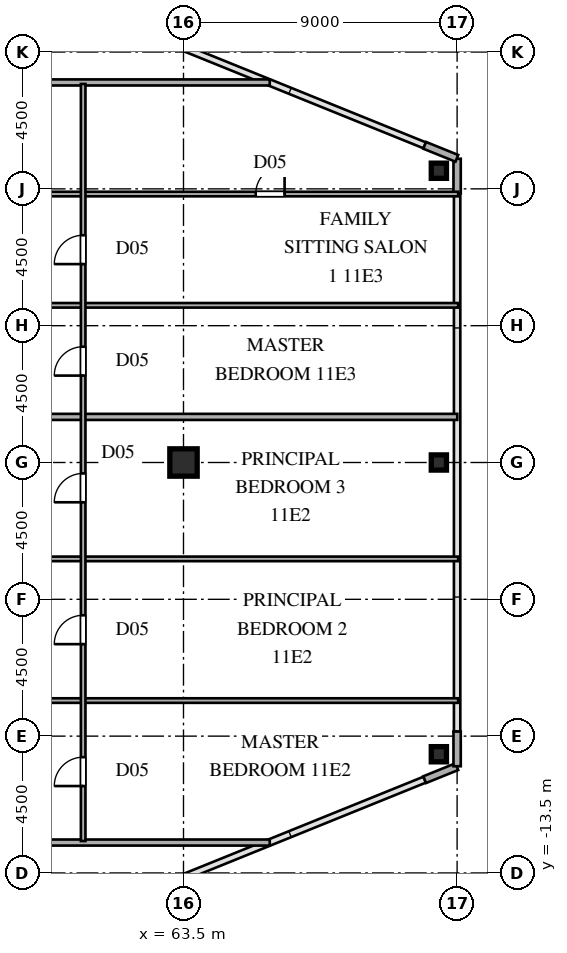
"""IFC4 building model, lengths in metres.
Left out: names, types, materials, properties, quantities, classifications, styles, units other than length and angle.
Written with IfcOpenShell. Run it as: python <this file> out.ifc"""

import sys

from ifc_helpers import new_model, si_unit, direction, frame, frame_2d, origin, origin_2d, place, context, subcontext, project, spatial, rectangle, hollow_rectangle, i_section, extrude, source, transform, mapped, element, fill, save


model = new_model("IFC4")
c1 = context("Model", 3, precision=1e-05, world=origin(), true_north=direction((0.0, 1.0)))
c2 = subcontext(c1, "Body", "Model", "MODEL_VIEW")
j1 = project(units=[si_unit("LENGTHUNIT", "METRE"), si_unit("PLANEANGLEUNIT", "RADIAN")], contexts=[c1])
p1 = place(None, origin())
s1 = spatial("IfcSite", under=j1, at=p1, CompositionType="ELEMENT")
p2 = place(p1, origin())
s2 = spatial("IfcBuilding", under=s1, at=p2, CompositionType="ELEMENT")
p3 = place(p2, frame((0.0, 0.0, 44.1)))
s3 = spatial("IfcBuildingStorey", under=s2, at=p3, CompositionType="ELEMENT", Elevation=44.1)
m1 = source(origin(), c2, "Body", "SweptSolid", [
    extrude(i_section(OverallWidth=0.9, OverallDepth=0.9, WebThickness=0.036, FlangeThickness=0.055, at=origin_2d()), origin(), (0.0, 0.0, 1.0), 3.6),
])
p4 = place(p3, frame((63.5, 0.0, 0.0), z_axis=(0.0, 0.0, 1.0), x_axis=(1.0, 0.0, 0.0)))
e1 = element("IfcColumn", 1, at=p4, inside=s3, PredefinedType="COLUMN", context=c2, shape_type="MappedRepresentation", body=[
    mapped(m1, transform((0.0, 0.0, 0.0), scale=1.0)),
])
m2 = source(origin(), c2, "Body", "SweptSolid", [
    extrude(hollow_rectangle(XDim=0.5, YDim=0.5, WallThickness=0.02, at=origin_2d()), origin(), (0.0, 0.0, 1.0), 3.6),
])
for number, where, z_axis, x_axis in (
    (2, (71.9, -9.596, 0.0), (0.0, 0.0, 1.0), (1.0, 0.0, 0.0)),
    (3, (71.9, 9.596, 0.0), (0.0, 0.0, 1.0), (1.0, 0.0, 0.0)),
    (4, (71.9, 0.0, 0.0), (0.0, 0.0, 1.0), (1.0, 0.0, 0.0)),
):
    element("IfcColumn", number, at=place(p3, frame(where, z_axis=z_axis, x_axis=x_axis)), inside=s3, PredefinedType="COLUMN", context=c2, shape_type="MappedRepresentation", body=[
        mapped(m2, transform((0.0, 0.0, 0.0), scale=1.0)),
    ])
for number, where, z_axis, x_axis in (
    (5, (71.434, -10.431, 0.0), (0.0, 0.0, 1.0), (0.927, 0.375, 0.0)),
    (6, (72.5, -9.99, 0.0), (0.0, 0.0, 1.0), (0.0, 1.0, 0.0)),
    (7, (72.5, 8.85, 0.0), (0.0, 0.0, 1.0), (0.0, 1.0, 0.0)),
    (8, (72.491, 10.004, 0.0), (0.0, 0.0, 1.0), (-0.927, 0.375, 0.0)),
):
    element("IfcWall", number, at=place(p3, frame(where, z_axis=z_axis, x_axis=x_axis)), inside=s3, PredefinedType="SOLIDWALL", context=c2, shape_type="SweptSolid", body=[
        extrude(rectangle(XDim=1.14, YDim=0.24, at=frame_2d((0.57, 0.0))), origin(), (0.0, 0.0, 1.0), 3.38),
    ])
p5 = place(p3, frame((39.93, -12.5, 0.0), z_axis=(0.0, 0.0, 1.0), x_axis=(1.0, 0.0, 0.0)))
e9 = element("IfcWall", 9, at=p5, inside=s3, PredefinedType="PARTITIONING", context=c2, shape_type="SweptSolid", body=[
    extrude(rectangle(XDim=26.407, YDim=0.2, at=frame_2d((13.204, 0.0))), origin(), (0.0, 0.0, 1.0), 3.38),
])
p6 = place(p3, frame((42.65, -7.83, 0.0), z_axis=(0.0, 0.0, 1.0), x_axis=(1.0, 0.0, 0.0)))
e10 = element("IfcWall", 10, at=p6, inside=s3, PredefinedType="PARTITIONING", context=c2, shape_type="SweptSolid", body=[
    extrude(rectangle(XDim=29.885, YDim=0.15, at=frame_2d((14.942, 0.0))), origin(), (0.0, 0.0, 1.0), 3.38),
])
p7 = place(p6, frame((5.425, 0.0, 0.0)))
e11 = element("IfcOpeningElement", 11, at=p7, cuts=e10, PredefinedType="OPENING", context=c2, shape_type="SweptSolid", body=[
    extrude(rectangle(XDim=0.95, YDim=2.15, at=frame_2d((0.475, 1.075))), frame((0.0, 0.085, 0.0), z_axis=(0.0, -1.0, 0.0), x_axis=(1.0, 0.0, 0.0)), (0.0, 0.0, 1.0), 0.17),
])
p8 = place(p6, frame((14.225, 0.0, 0.0)))
e12 = element("IfcOpeningElement", 12, at=p8, cuts=e10, PredefinedType="OPENING", context=c2, shape_type="SweptSolid", body=[
    extrude(rectangle(XDim=0.95, YDim=2.15, at=frame_2d((0.475, 1.075))), frame((0.0, 0.085, 0.0), z_axis=(0.0, -1.0, 0.0), x_axis=(1.0, 0.0, 0.0)), (0.0, 0.0, 1.0), 0.17),
])
p9 = place(p3, frame((42.65, -3.17, 0.0), z_axis=(0.0, 0.0, 1.0), x_axis=(1.0, 0.0, 0.0)))
e13 = element("IfcWall", 13, at=p9, inside=s3, PredefinedType="PARTITIONING", context=c2, shape_type="SweptSolid", body=[
    extrude(rectangle(XDim=29.885, YDim=0.15, at=frame_2d((14.942, 0.0))), origin(), (0.0, 0.0, 1.0), 3.38),
])
p10 = place(p9, frame((5.425, 0.0, 0.0)))
e14 = element("IfcOpeningElement", 14, at=p10, cuts=e13, PredefinedType="OPENING", context=c2, shape_type="SweptSolid", body=[
    extrude(rectangle(XDim=0.95, YDim=2.15, at=frame_2d((0.475, 1.075))), frame((0.0, 0.085, 0.0), z_axis=(0.0, -1.0, 0.0), x_axis=(1.0, 0.0, 0.0)), (0.0, 0.0, 1.0), 0.17),
])
p11 = place(p9, frame((14.225, 0.0, 0.0)))
e15 = element("IfcOpeningElement", 15, at=p11, cuts=e13, PredefinedType="OPENING", context=c2, shape_type="SweptSolid", body=[
    extrude(rectangle(XDim=0.95, YDim=2.15, at=frame_2d((0.475, 1.075))), frame((0.0, 0.085, 0.0), z_axis=(0.0, -1.0, 0.0), x_axis=(1.0, 0.0, 0.0)), (0.0, 0.0, 1.0), 0.17),
])
p12 = place(p3, frame((39.93, 1.5, 0.0), z_axis=(0.0, 0.0, 1.0), x_axis=(1.0, 0.0, 0.0)))
e16 = element("IfcWall", 16, at=p12, inside=s3, PredefinedType="PARTITIONING", context=c2, shape_type="SweptSolid", body=[
    extrude(rectangle(XDim=32.575, YDim=0.2, at=frame_2d((16.288, 0.0))), origin(), (0.0, 0.0, 1.0), 3.38),
])
p13 = place(p3, frame((42.65, 5.17, 0.0), z_axis=(0.0, 0.0, 1.0), x_axis=(1.0, 0.0, 0.0)))
e17 = element("IfcWall", 17, at=p13, inside=s3, PredefinedType="PARTITIONING", context=c2, shape_type="SweptSolid", body=[
    extrude(rectangle(XDim=29.885, YDim=0.15, at=frame_2d((14.942, 0.0))), origin(), (0.0, 0.0, 1.0), 3.38),
])
p14 = place(p13, frame((5.425, 0.0, 0.0)))
e18 = element("IfcOpeningElement", 18, at=p14, cuts=e17, PredefinedType="OPENING", context=c2, shape_type="SweptSolid", body=[
    extrude(rectangle(XDim=0.95, YDim=2.15, at=frame_2d((0.475, 1.075))), frame((0.0, 0.085, 0.0), z_axis=(0.0, -1.0, 0.0), x_axis=(1.0, 0.0, 0.0)), (0.0, 0.0, 1.0), 0.17),
])
p15 = place(p13, frame((14.225, 0.0, 0.0)))
e19 = element("IfcOpeningElement", 19, at=p15, cuts=e17, PredefinedType="OPENING", context=c2, shape_type="SweptSolid", body=[
    extrude(rectangle(XDim=0.95, YDim=2.15, at=frame_2d((0.475, 1.075))), frame((0.0, 0.085, 0.0), z_axis=(0.0, -1.0, 0.0), x_axis=(1.0, 0.0, 0.0)), (0.0, 0.0, 1.0), 0.17),
])
p16 = place(p3, frame((42.65, 8.83, 0.0), z_axis=(0.0, 0.0, 1.0), x_axis=(1.0, 0.0, 0.0)))
e20 = element("IfcWall", 20, at=p16, inside=s3, PredefinedType="PARTITIONING", context=c2, shape_type="SweptSolid", body=[
    extrude(rectangle(XDim=29.885, YDim=0.15, at=frame_2d((14.942, 0.0))), origin(), (0.0, 0.0, 1.0), 3.38),
])
p17 = place(p16, frame((5.425, 0.0, 0.0)))
e21 = element("IfcOpeningElement", 21, at=p17, cuts=e20, PredefinedType="OPENING", context=c2, shape_type="SweptSolid", body=[
    extrude(rectangle(XDim=0.95, YDim=2.15, at=frame_2d((0.475, 1.075))), frame((0.0, 0.085, 0.0), z_axis=(0.0, -1.0, 0.0), x_axis=(1.0, 0.0, 0.0)), (0.0, 0.0, 1.0), 0.17),
])
p18 = place(p16, frame((23.225, 0.0, 0.0)))
e22 = element("IfcOpeningElement", 22, at=p18, cuts=e20, PredefinedType="OPENING", context=c2, shape_type="SweptSolid", body=[
    extrude(rectangle(XDim=0.95, YDim=2.15, at=frame_2d((0.475, 1.075))), frame((0.0, 0.085, 0.0), z_axis=(0.0, -1.0, 0.0), x_axis=(1.0, 0.0, 0.0)), (0.0, 0.0, 1.0), 0.17),
])
p19 = place(p16, frame((14.225, 0.0, 0.0)))
e23 = element("IfcOpeningElement", 23, at=p19, cuts=e20, PredefinedType="OPENING", context=c2, shape_type="SweptSolid", body=[
    extrude(rectangle(XDim=0.95, YDim=2.15, at=frame_2d((0.475, 1.075))), frame((0.0, 0.085, 0.0), z_axis=(0.0, -1.0, 0.0), x_axis=(1.0, 0.0, 0.0)), (0.0, 0.0, 1.0), 0.17),
])
p20 = place(p3, frame((39.93, 12.5, 0.0), z_axis=(0.0, 0.0, 1.0), x_axis=(1.0, 0.0, 0.0)))
e24 = element("IfcWall", 24, at=p20, inside=s3, PredefinedType="PARTITIONING", context=c2, shape_type="SweptSolid", body=[
    extrude(rectangle(XDim=26.407, YDim=0.2, at=frame_2d((13.204, 0.0))), origin(), (0.0, 0.0, 1.0), 3.38),
])
p21 = place(p3, frame((60.2, -12.45, 0.0), z_axis=(0.0, 0.0, 1.0), x_axis=(0.0, 1.0, 0.0)))
e25 = element("IfcWall", 25, at=p21, inside=s3, PredefinedType="PARTITIONING", context=c2, shape_type="SweptSolid", body=[
    extrude(rectangle(XDim=24.9, YDim=0.15, at=frame_2d((12.45, 0.0))), origin(), (0.0, 0.0, 1.0), 3.38),
])
p22 = place(p21, frame((1.808, 0.0, 0.0)))
e26 = element("IfcOpeningElement", 26, at=p22, cuts=e25, PredefinedType="OPENING", context=c2, shape_type="SweptSolid", body=[
    extrude(rectangle(XDim=0.95, YDim=2.15, at=frame_2d((0.475, 1.075))), frame((0.0, 0.085, 0.0), z_axis=(0.0, -1.0, 0.0), x_axis=(1.0, 0.0, 0.0)), (0.0, 0.0, 1.0), 0.17),
])
p23 = place(p21, frame((6.475, 0.0, 0.0)))
e27 = element("IfcOpeningElement", 27, at=p23, cuts=e25, PredefinedType="OPENING", context=c2, shape_type="SweptSolid", body=[
    extrude(rectangle(XDim=0.95, YDim=2.15, at=frame_2d((0.475, 1.075))), frame((0.0, 0.085, 0.0), z_axis=(0.0, -1.0, 0.0), x_axis=(1.0, 0.0, 0.0)), (0.0, 0.0, 1.0), 0.17),
])
p24 = place(p21, frame((11.142, 0.0, 0.0)))
e28 = element("IfcOpeningElement", 28, at=p24, cuts=e25, PredefinedType="OPENING", context=c2, shape_type="SweptSolid", body=[
    extrude(rectangle(XDim=0.95, YDim=2.15, at=frame_2d((0.475, 1.075))), frame((0.0, 0.085, 0.0), z_axis=(0.0, -1.0, 0.0), x_axis=(1.0, 0.0, 0.0)), (0.0, 0.0, 1.0), 0.17),
])
p25 = place(p21, frame((15.308, 0.0, 0.0)))
e29 = element("IfcOpeningElement", 29, at=p25, cuts=e25, PredefinedType="OPENING", context=c2, shape_type="SweptSolid", body=[
    extrude(rectangle(XDim=0.95, YDim=2.15, at=frame_2d((0.475, 1.075))), frame((0.0, 0.085, 0.0), z_axis=(0.0, -1.0, 0.0), x_axis=(1.0, 0.0, 0.0)), (0.0, 0.0, 1.0), 0.17),
])
p26 = place(p21, frame((18.975, 0.0, 0.0)))
e30 = element("IfcOpeningElement", 30, at=p26, cuts=e25, PredefinedType="OPENING", context=c2, shape_type="SweptSolid", body=[
    extrude(rectangle(XDim=0.95, YDim=2.15, at=frame_2d((0.475, 1.075))), frame((0.0, 0.085, 0.0), z_axis=(0.0, -1.0, 0.0), x_axis=(1.0, 0.0, 0.0)), (0.0, 0.0, 1.0), 0.17),
])
m3 = source(origin(), c2, "Body", "SweptSolid", [
    extrude(rectangle(XDim=0.95, YDim=2.15, at=frame_2d((0.475, 1.075))), frame((0.0, 0.025, 0.0), z_axis=(0.0, -1.0, 0.0), x_axis=(1.0, 0.0, 0.0)), (0.0, 0.0, 1.0), 0.05),
])
p27 = place(p18, origin())
e31 = element("IfcDoor", 31, at=p27, inside=s3, OperationType="SINGLE_SWING_RIGHT", PredefinedType="DOOR", context=c2, shape_type="MappedRepresentation", body=[
    mapped(m3, transform((0.0, 0.0, 0.0), scale=1.0)),
])
fill(e22, e31)
p28 = place(p22, origin())
e32 = element("IfcDoor", 32, at=p28, inside=s3, OperationType="SINGLE_SWING_LEFT", PredefinedType="DOOR", context=c2, shape_type="MappedRepresentation", body=[
    mapped(m3, transform((0.0, 0.0, 0.0), scale=1.0)),
])
fill(e26, e32)
p29 = place(p23, origin())
e33 = element("IfcDoor", 33, at=p29, inside=s3, OperationType="SINGLE_SWING_LEFT", PredefinedType="DOOR", context=c2, shape_type="MappedRepresentation", body=[
    mapped(m3, transform((0.0, 0.0, 0.0), scale=1.0)),
])
fill(e27, e33)
p30 = place(p24, origin())
e34 = element("IfcDoor", 34, at=p30, inside=s3, OperationType="SINGLE_SWING_LEFT", PredefinedType="DOOR", context=c2, shape_type="MappedRepresentation", body=[
    mapped(m3, transform((0.0, 0.0, 0.0), scale=1.0)),
])
fill(e28, e34)
p31 = place(p25, origin())
e35 = element("IfcDoor", 35, at=p31, inside=s3, OperationType="SINGLE_SWING_LEFT", PredefinedType="DOOR", context=c2, shape_type="MappedRepresentation", body=[
    mapped(m3, transform((0.0, 0.0, 0.0), scale=1.0)),
])
fill(e29, e35)
p32 = place(p26, origin())
e36 = element("IfcDoor", 36, at=p32, inside=s3, OperationType="SINGLE_SWING_LEFT", PredefinedType="DOOR", context=c2, shape_type="MappedRepresentation", body=[
    mapped(m3, transform((0.0, 0.0, 0.0), scale=1.0)),
])
fill(e30, e36)
save(model, sys.argv[1])
